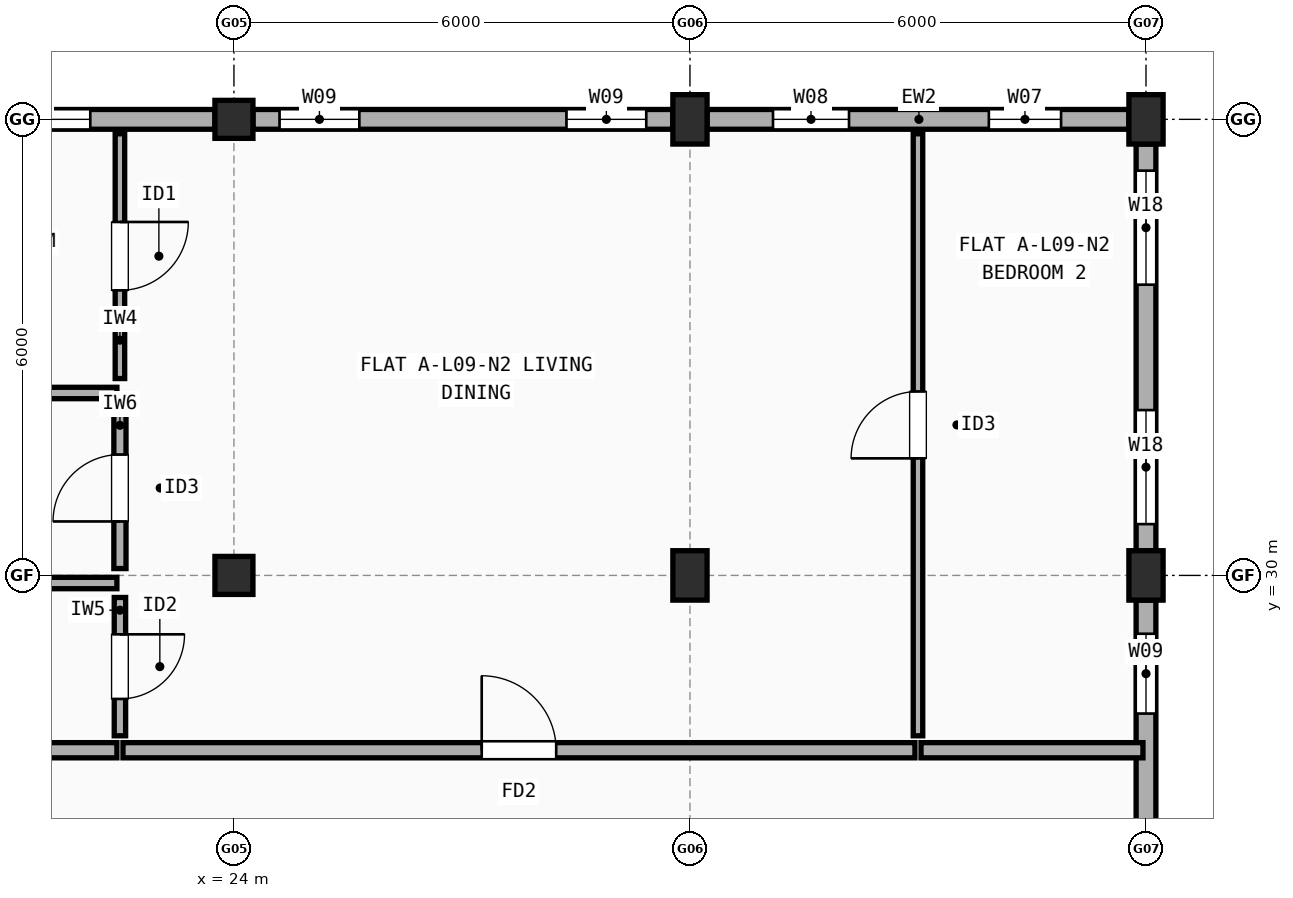
"""IFC4 building model, lengths in metres.
Left out: names, types, materials, properties, quantities, classifications, styles, units other than length and angle.
Written with IfcOpenShell. Run it as: python <this file> out.ifc"""

import sys

from ifc_helpers import new_model, si_unit, direction, frame, frame_2d, origin, origin_2d, place, context, subcontext, project, spatial, rectangle, extrude, element, fill, save


model = new_model("IFC4")
c1 = context("Model", 3, precision=1e-05, world=origin(), true_north=direction((0.0, 1.0)))
c2 = subcontext(c1, "Body", "Model", "MODEL_VIEW")
j1 = project(units=[si_unit("LENGTHUNIT", "METRE"), si_unit("PLANEANGLEUNIT", "RADIAN")], contexts=[c1])
p1 = place(None, origin())
s1 = spatial("IfcSite", under=j1, at=p1, CompositionType="ELEMENT")
p2 = place(p1, origin())
s2 = spatial("IfcBuilding", under=s1, at=p2, CompositionType="ELEMENT")
p3 = place(p2, frame((0.0, 0.0, 30.1)))
s3 = spatial("IfcBuildingStorey", under=s2, at=p3, CompositionType="ELEMENT", Elevation=30.1)
for number, where, z_axis, x_axis in (
    (1, (24.0, 30.0, 0.0), (0.0, 0.0, 1.0), (1.0, 0.0, 0.0)),
    (2, (24.0, 36.0, 0.0), (0.0, 0.0, 1.0), (1.0, 0.0, 0.0)),
):
    element("IfcColumn", number, at=place(p3, frame(where, z_axis=z_axis, x_axis=x_axis)), inside=s3, PredefinedType="COLUMN", context=c2, shape_type="SweptSolid", body=[
        extrude(rectangle(XDim=0.5, YDim=0.5, at=origin_2d()), origin(), (0.0, 0.0, 1.0), 2.985),
    ])
for number, where, z_axis, x_axis in (
    (3, (30.0, 30.0, 0.0), (0.0, 0.0, 1.0), (1.0, 0.0, 0.0)),
    (4, (30.0, 36.0, 0.0), (0.0, 0.0, 1.0), (1.0, 0.0, 0.0)),
    (5, (36.0, 30.0, 0.0), (0.0, 0.0, 1.0), (1.0, 0.0, 0.0)),
    (6, (36.0, 36.0, 0.0), (0.0, 0.0, 1.0), (1.0, 0.0, 0.0)),
):
    element("IfcColumn", number, at=place(p3, frame(where, z_axis=z_axis, x_axis=x_axis)), inside=s3, PredefinedType="COLUMN", context=c2, shape_type="SweptSolid", body=[
        extrude(rectangle(XDim=0.45, YDim=0.65, at=origin_2d()), origin(), (0.0, 0.0, 1.0), 2.985),
    ])
p4 = place(p3, frame((36.0, 24.325, 0.0), z_axis=(0.0, 0.0, 1.0), x_axis=(0.0, 1.0, 0.0)))
e7 = element("IfcWall", 7, at=p4, inside=s3, PredefinedType="STANDARD", context=c2, shape_type="SweptSolid", body=[
    extrude(rectangle(XDim=5.35, YDim=0.26, at=frame_2d((2.675, 0.0))), origin(), (0.0, 0.0, 1.0), 2.467),
])
p5 = place(p4, frame((1.143, 0.0, 0.9)))
e8 = element("IfcOpeningElement", 8, at=p5, cuts=e7, PredefinedType="OPENING", context=c2, shape_type="SweptSolid", body=[
    extrude(rectangle(XDim=1.05, YDim=1.35, at=frame_2d((0.525, 0.675))), frame((0.0, 0.14, 0.0), z_axis=(0.0, -1.0, 0.0), x_axis=(1.0, 0.0, 0.0)), (0.0, 0.0, 1.0), 0.28),
])
p6 = place(p4, frame((3.857, 0.0, 0.9)))
e9 = element("IfcOpeningElement", 9, at=p6, cuts=e7, PredefinedType="OPENING", context=c2, shape_type="SweptSolid", body=[
    extrude(rectangle(XDim=1.05, YDim=1.35, at=frame_2d((0.525, 0.675))), frame((0.0, 0.14, 0.0), z_axis=(0.0, -1.0, 0.0), x_axis=(1.0, 0.0, 0.0)), (0.0, 0.0, 1.0), 0.28),
])
p7 = place(p3, frame((36.0, 30.325, 0.0), z_axis=(0.0, 0.0, 1.0), x_axis=(0.0, 1.0, 0.0)))
e10 = element("IfcWall", 10, at=p7, inside=s3, PredefinedType="STANDARD", context=c2, shape_type="SweptSolid", body=[
    extrude(rectangle(XDim=5.35, YDim=0.26, at=frame_2d((2.675, 0.0))), origin(), (0.0, 0.0, 1.0), 2.467),
])
p8 = place(p7, frame((0.35, 0.0, 0.9)))
e11 = element("IfcOpeningElement", 11, at=p8, cuts=e10, PredefinedType="OPENING", context=c2, shape_type="SweptSolid", body=[
    extrude(rectangle(XDim=1.5, YDim=1.4, at=frame_2d((0.75, 0.7))), frame((0.0, 0.14, 0.0), z_axis=(0.0, -1.0, 0.0), x_axis=(1.0, 0.0, 0.0)), (0.0, 0.0, 1.0), 0.28),
])
p9 = place(p7, frame((3.5, 0.0, 0.9)))
e12 = element("IfcOpeningElement", 12, at=p9, cuts=e10, PredefinedType="OPENING", context=c2, shape_type="SweptSolid", body=[
    extrude(rectangle(XDim=1.5, YDim=1.4, at=frame_2d((0.75, 0.7))), frame((0.0, 0.14, 0.0), z_axis=(0.0, -1.0, 0.0), x_axis=(1.0, 0.0, 0.0)), (0.0, 0.0, 1.0), 0.28),
])
p10 = place(p3, frame((35.775, 36.0, 0.0), z_axis=(0.0, 0.0, 1.0), x_axis=(-1.0, 0.0, 0.0)))
e13 = element("IfcWall", 13, at=p10, inside=s3, PredefinedType="STANDARD", context=c2, shape_type="SweptSolid", body=[
    extrude(rectangle(XDim=5.55, YDim=0.26, at=frame_2d((2.775, 0.0))), origin(), (0.0, 0.0, 1.0), 2.467),
])
p11 = place(p10, frame((0.893, 0.0, 0.9)))
e14 = element("IfcOpeningElement", 14, at=p11, cuts=e13, PredefinedType="OPENING", context=c2, shape_type="SweptSolid", body=[
    extrude(rectangle(XDim=0.95, YDim=1.35, at=frame_2d((0.475, 0.675))), frame((0.0, 0.14, 0.0), z_axis=(0.0, -1.0, 0.0), x_axis=(1.0, 0.0, 0.0)), (0.0, 0.0, 1.0), 0.28),
])
p12 = place(p10, frame((3.683, 0.0, 0.9)))
e15 = element("IfcOpeningElement", 15, at=p12, cuts=e13, PredefinedType="OPENING", context=c2, shape_type="SweptSolid", body=[
    extrude(rectangle(XDim=1.0, YDim=1.4, at=frame_2d((0.5, 0.7))), frame((0.0, 0.14, 0.0), z_axis=(0.0, -1.0, 0.0), x_axis=(1.0, 0.0, 0.0)), (0.0, 0.0, 1.0), 0.28),
])
p13 = place(p3, frame((29.775, 36.0, 0.0), z_axis=(0.0, 0.0, 1.0), x_axis=(-1.0, 0.0, 0.0)))
e16 = element("IfcWall", 16, at=p13, inside=s3, PredefinedType="STANDARD", context=c2, shape_type="SweptSolid", body=[
    extrude(rectangle(XDim=5.525, YDim=0.26, at=frame_2d((2.762, 0.0))), origin(), (0.0, 0.0, 1.0), 2.467),
])
p14 = place(p13, frame((0.35, 0.0, 0.9)))
e17 = element("IfcOpeningElement", 17, at=p14, cuts=e16, PredefinedType="OPENING", context=c2, shape_type="SweptSolid", body=[
    extrude(rectangle(XDim=1.05, YDim=1.35, at=frame_2d((0.525, 0.675))), frame((0.0, 0.14, 0.0), z_axis=(0.0, -1.0, 0.0), x_axis=(1.0, 0.0, 0.0)), (0.0, 0.0, 1.0), 0.28),
])
p15 = place(p13, frame((4.125, 0.0, 0.9)))
e18 = element("IfcOpeningElement", 18, at=p15, cuts=e16, PredefinedType="OPENING", context=c2, shape_type="SweptSolid", body=[
    extrude(rectangle(XDim=1.05, YDim=1.35, at=frame_2d((0.525, 0.675))), frame((0.0, 0.14, 0.0), z_axis=(0.0, -1.0, 0.0), x_axis=(1.0, 0.0, 0.0)), (0.0, 0.0, 1.0), 0.28),
])
p16 = place(p3, frame((23.75, 36.0, 0.0), z_axis=(0.0, 0.0, 1.0), x_axis=(-1.0, 0.0, 0.0)))
e19 = element("IfcWall", 19, at=p16, inside=s3, PredefinedType="STANDARD", context=c2, shape_type="SweptSolid", body=[
    extrude(rectangle(XDim=5.5, YDim=0.26, at=frame_2d((2.75, 0.0))), origin(), (0.0, 0.0, 1.0), 2.467),
])
p17 = place(p16, frame((1.64, 0.0, 0.9)))
e20 = element("IfcOpeningElement", 20, at=p17, cuts=e19, PredefinedType="OPENING", context=c2, shape_type="SweptSolid", body=[
    extrude(rectangle(XDim=1.5, YDim=1.4, at=frame_2d((0.75, 0.7))), frame((0.0, 0.14, 0.0), z_axis=(0.0, -1.0, 0.0), x_axis=(1.0, 0.0, 0.0)), (0.0, 0.0, 1.0), 0.28),
])
p18 = place(p16, frame((3.65, 0.0, 0.9)))
e21 = element("IfcOpeningElement", 21, at=p18, cuts=e19, PredefinedType="OPENING", context=c2, shape_type="SweptSolid", body=[
    extrude(rectangle(XDim=1.5, YDim=1.4, at=frame_2d((0.75, 0.7))), frame((0.0, 0.14, 0.0), z_axis=(0.0, -1.0, 0.0), x_axis=(1.0, 0.0, 0.0)), (0.0, 0.0, 1.0), 0.28),
])
p19 = place(p3, frame((18.04, 27.7, 0.0), z_axis=(0.0, 0.0, 1.0), x_axis=(1.0, 0.0, 0.0)))
e22 = element("IfcWall", 22, at=p19, inside=s3, PredefinedType="SOLIDWALL", context=c2, shape_type="SweptSolid", body=[
    extrude(rectangle(XDim=4.42, YDim=0.2, at=frame_2d((2.21, 0.0))), origin(), (0.0, 0.0, 1.0), 2.985),
])
p20 = place(p3, frame((22.54, 27.7, 0.0), z_axis=(0.0, 0.0, 1.0), x_axis=(1.0, 0.0, 0.0)))
e23 = element("IfcWall", 23, at=p20, inside=s3, PredefinedType="SOLIDWALL", context=c2, shape_type="SweptSolid", body=[
    extrude(rectangle(XDim=10.42, YDim=0.2, at=frame_2d((5.21, 0.0))), origin(), (0.0, 0.0, 1.0), 2.467),
])
p21 = place(p20, frame((4.72, 0.0, 0.0)))
e24 = element("IfcOpeningElement", 24, at=p21, cuts=e23, PredefinedType="OPENING", context=c2, shape_type="SweptSolid", body=[
    extrude(rectangle(XDim=0.98, YDim=2.15, at=frame_2d((0.49, 1.075))), frame((0.0, 0.11, 0.0), z_axis=(0.0, -1.0, 0.0), x_axis=(1.0, 0.0, 0.0)), (0.0, 0.0, 1.0), 0.22),
])
p22 = place(p3, frame((22.5, 32.59, 0.0), z_axis=(0.0, 0.0, 1.0), x_axis=(0.0, 1.0, 0.0)))
e25 = element("IfcWall", 25, at=p22, inside=s3, PredefinedType="PARTITIONING", context=c2, shape_type="SweptSolid", body=[
    extrude(rectangle(XDim=3.22, YDim=0.125, at=frame_2d((1.61, 0.0))), origin(), (0.0, 0.0, 1.0), 2.985),
])
p23 = place(p22, frame((1.16, 0.0, 0.0)))
e26 = element("IfcOpeningElement", 26, at=p23, cuts=e25, PredefinedType="OPENING", context=c2, shape_type="SweptSolid", body=[
    extrude(rectangle(XDim=0.9, YDim=2.1, at=frame_2d((0.45, 1.05))), frame((0.0, 0.073, 0.0), z_axis=(0.0, -1.0, 0.0), x_axis=(1.0, 0.0, 0.0)), (0.0, 0.0, 1.0), 0.145),
])
p24 = place(p3, frame((22.5, 30.09, 0.0), z_axis=(0.0, 0.0, 1.0), x_axis=(0.0, 1.0, 0.0)))
e27 = element("IfcWall", 27, at=p24, inside=s3, PredefinedType="PLUMBINGWALL", context=c2, shape_type="SweptSolid", body=[
    extrude(rectangle(XDim=2.12, YDim=0.16, at=frame_2d((1.06, 0.0))), origin(), (0.0, 0.0, 1.0), 2.467),
])
p25 = place(p24, frame((0.62, 0.0, 0.0)))
e28 = element("IfcOpeningElement", 28, at=p25, cuts=e27, PredefinedType="OPENING", context=c2, shape_type="SweptSolid", body=[
    extrude(rectangle(XDim=0.88, YDim=2.1, at=frame_2d((0.44, 1.05))), frame((0.0, 0.09, 0.0), z_axis=(0.0, -1.0, 0.0), x_axis=(1.0, 0.0, 0.0)), (0.0, 0.0, 1.0), 0.18),
])
p26 = place(p3, frame((22.5, 27.89, 0.0), z_axis=(0.0, 0.0, 1.0), x_axis=(0.0, 1.0, 0.0)))
e29 = element("IfcWall", 29, at=p26, inside=s3, PredefinedType="PARTITIONING", context=c2, shape_type="SweptSolid", body=[
    extrude(rectangle(XDim=1.82, YDim=0.15, at=frame_2d((0.91, 0.0))), origin(), (0.0, 0.0, 1.0), 2.985),
])
p27 = place(p26, frame((0.485, 0.0, 0.0)))
e30 = element("IfcOpeningElement", 30, at=p27, cuts=e29, PredefinedType="OPENING", context=c2, shape_type="SweptSolid", body=[
    extrude(rectangle(XDim=0.85, YDim=2.1, at=frame_2d((0.425, 1.05))), frame((0.0, 0.085, 0.0), z_axis=(0.0, -1.0, 0.0), x_axis=(1.0, 0.0, 0.0)), (0.0, 0.0, 1.0), 0.17),
])
p28 = place(p3, frame((18.04, 32.4, 0.0), z_axis=(0.0, 0.0, 1.0), x_axis=(1.0, 0.0, 0.0)))
e31 = element("IfcWall", 31, at=p28, inside=s3, PredefinedType="PARTITIONING", context=c2, shape_type="SweptSolid", body=[
    extrude(rectangle(XDim=4.42, YDim=0.15, at=frame_2d((2.21, 0.0))), origin(), (0.0, 0.0, 1.0), 2.548),
])
p29 = place(p3, frame((18.36, 29.9, 0.0), z_axis=(0.0, 0.0, 1.0), x_axis=(1.0, 0.0, 0.0)))
e32 = element("IfcWall", 32, at=p29, inside=s3, PredefinedType="PARTITIONING", context=c2, shape_type="SweptSolid", body=[
    extrude(rectangle(XDim=4.1, YDim=0.15, at=frame_2d((2.05, 0.0))), origin(), (0.0, 0.0, 1.0), 2.467),
])
p30 = place(p3, frame((33.04, 27.7, 0.0), z_axis=(0.0, 0.0, 1.0), x_axis=(1.0, 0.0, 0.0)))
e33 = element("IfcWall", 33, at=p30, inside=s3, PredefinedType="SOLIDWALL", context=c2, shape_type="SweptSolid", body=[
    extrude(rectangle(XDim=2.92, YDim=0.2, at=frame_2d((1.46, 0.0))), origin(), (0.0, 0.0, 1.0), 2.467),
])
p31 = place(p3, frame((33.0, 27.89, 0.0), z_axis=(0.0, 0.0, 1.0), x_axis=(0.0, 1.0, 0.0)))
e34 = element("IfcWall", 34, at=p31, inside=s3, PredefinedType="PARTITIONING", context=c2, shape_type="SweptSolid", body=[
    extrude(rectangle(XDim=7.92, YDim=0.125, at=frame_2d((3.96, 0.0))), origin(), (0.0, 0.0, 1.0), 2.467),
])
p32 = place(p31, frame((3.65, 0.0, 0.0)))
e35 = element("IfcOpeningElement", 35, at=p32, cuts=e34, PredefinedType="OPENING", context=c2, shape_type="SweptSolid", body=[
    extrude(rectangle(XDim=0.88, YDim=2.1, at=frame_2d((0.44, 1.05))), frame((0.0, 0.073, 0.0), z_axis=(0.0, -1.0, 0.0), x_axis=(1.0, 0.0, 0.0)), (0.0, 0.0, 1.0), 0.145),
])
p33 = place(p6, origin())
e36 = element("IfcWindow", 36, at=p33, inside=s3, PartitioningType="SINGLE_PANEL", PredefinedType="WINDOW", context=c2, shape_type="SweptSolid", body=[
    extrude(rectangle(XDim=1.05, YDim=1.35, at=frame_2d((0.525, 0.675))), frame((0.0, 0.03, 0.0), z_axis=(0.0, -1.0, 0.0), x_axis=(1.0, 0.0, 0.0)), (0.0, 0.0, 1.0), 0.06),
])
fill(e9, e36)
p34 = place(p8, origin())
e37 = element("IfcWindow", 37, at=p34, inside=s3, PartitioningType="SINGLE_PANEL", PredefinedType="WINDOW", context=c2, shape_type="SweptSolid", body=[
    extrude(rectangle(XDim=1.5, YDim=1.4, at=frame_2d((0.75, 0.7))), frame((0.0, 0.03, 0.0), z_axis=(0.0, -1.0, 0.0), x_axis=(1.0, 0.0, 0.0)), (0.0, 0.0, 1.0), 0.06),
])
fill(e11, e37)
p35 = place(p9, origin())
e38 = element("IfcWindow", 38, at=p35, inside=s3, PartitioningType="SINGLE_PANEL", PredefinedType="WINDOW", context=c2, shape_type="SweptSolid", body=[
    extrude(rectangle(XDim=1.5, YDim=1.4, at=frame_2d((0.75, 0.7))), frame((0.0, 0.03, 0.0), z_axis=(0.0, -1.0, 0.0), x_axis=(1.0, 0.0, 0.0)), (0.0, 0.0, 1.0), 0.06),
])
fill(e12, e38)
p36 = place(p11, origin())
e39 = element("IfcWindow", 39, at=p36, inside=s3, PartitioningType="SINGLE_PANEL", PredefinedType="WINDOW", context=c2, shape_type="SweptSolid", body=[
    extrude(rectangle(XDim=0.95, YDim=1.35, at=frame_2d((0.475, 0.675))), frame((0.0, 0.03, 0.0), z_axis=(0.0, -1.0, 0.0), x_axis=(1.0, 0.0, 0.0)), (0.0, 0.0, 1.0), 0.06),
])
fill(e14, e39)
p37 = place(p12, origin())
e40 = element("IfcWindow", 40, at=p37, inside=s3, PartitioningType="SINGLE_PANEL", PredefinedType="WINDOW", context=c2, shape_type="SweptSolid", body=[
    extrude(rectangle(XDim=1.0, YDim=1.4, at=frame_2d((0.5, 0.7))), frame((0.0, 0.03, 0.0), z_axis=(0.0, -1.0, 0.0), x_axis=(1.0, 0.0, 0.0)), (0.0, 0.0, 1.0), 0.06),
])
fill(e15, e40)
p38 = place(p14, origin())
e41 = element("IfcWindow", 41, at=p38, inside=s3, PartitioningType="SINGLE_PANEL", PredefinedType="WINDOW", context=c2, shape_type="SweptSolid", body=[
    extrude(rectangle(XDim=1.05, YDim=1.35, at=frame_2d((0.525, 0.675))), frame((0.0, 0.03, 0.0), z_axis=(0.0, -1.0, 0.0), x_axis=(1.0, 0.0, 0.0)), (0.0, 0.0, 1.0), 0.06),
])
fill(e17, e41)
p39 = place(p15, origin())
e42 = element("IfcWindow", 42, at=p39, inside=s3, PartitioningType="SINGLE_PANEL", PredefinedType="WINDOW", context=c2, shape_type="SweptSolid", body=[
    extrude(rectangle(XDim=1.05, YDim=1.35, at=frame_2d((0.525, 0.675))), frame((0.0, 0.03, 0.0), z_axis=(0.0, -1.0, 0.0), x_axis=(1.0, 0.0, 0.0)), (0.0, 0.0, 1.0), 0.06),
])
fill(e18, e42)
p40 = place(p17, origin())
e43 = element("IfcWindow", 43, at=p40, inside=s3, PartitioningType="SINGLE_PANEL", PredefinedType="WINDOW", context=c2, shape_type="SweptSolid", body=[
    extrude(rectangle(XDim=1.5, YDim=1.4, at=frame_2d((0.75, 0.7))), frame((0.0, 0.03, 0.0), z_axis=(0.0, -1.0, 0.0), x_axis=(1.0, 0.0, 0.0)), (0.0, 0.0, 1.0), 0.06),
])
fill(e20, e43)
p41 = place(p21, origin())
e44 = element("IfcDoor", 44, at=p41, inside=s3, OperationType="SINGLE_SWING_LEFT", PredefinedType="DOOR", context=c2, shape_type="SweptSolid", body=[
    extrude(rectangle(XDim=0.98, YDim=2.15, at=frame_2d((0.49, 1.075))), frame((0.0, 0.025, 0.0), z_axis=(0.0, -1.0, 0.0), x_axis=(1.0, 0.0, 0.0)), (0.0, 0.0, 1.0), 0.05),
])
fill(e24, e44)
p42 = place(p23, origin())
e45 = element("IfcDoor", 45, at=p42, inside=s3, OperationType="SINGLE_SWING_RIGHT", PredefinedType="DOOR", context=c2, shape_type="SweptSolid", body=[
    extrude(rectangle(XDim=0.9, YDim=2.1, at=frame_2d((0.45, 1.05))), frame((0.0, 0.025, 0.0), z_axis=(0.0, -1.0, 0.0), x_axis=(1.0, 0.0, 0.0)), (0.0, 0.0, 1.0), 0.05),
])
fill(e26, e45)
p43 = place(p25, origin())
e46 = element("IfcDoor", 46, at=p43, inside=s3, OperationType="SINGLE_SWING_LEFT", PredefinedType="DOOR", context=c2, shape_type="SweptSolid", body=[
    extrude(rectangle(XDim=0.88, YDim=2.1, at=frame_2d((0.44, 1.05))), frame((0.0, 0.025, 0.0), z_axis=(0.0, -1.0, 0.0), x_axis=(1.0, 0.0, 0.0)), (0.0, 0.0, 1.0), 0.05),
])
fill(e28, e46)
p44 = place(p27, origin())
e47 = element("IfcDoor", 47, at=p44, inside=s3, OperationType="SINGLE_SWING_RIGHT", PredefinedType="DOOR", context=c2, shape_type="SweptSolid", body=[
    extrude(rectangle(XDim=0.85, YDim=2.1, at=frame_2d((0.425, 1.05))), frame((0.0, 0.025, 0.0), z_axis=(0.0, -1.0, 0.0), x_axis=(1.0, 0.0, 0.0)), (0.0, 0.0, 1.0), 0.05),
])
fill(e30, e47)
p45 = place(p32, origin())
e48 = element("IfcDoor", 48, at=p45, inside=s3, OperationType="SINGLE_SWING_LEFT", PredefinedType="DOOR", context=c2, shape_type="SweptSolid", body=[
    extrude(rectangle(XDim=0.88, YDim=2.1, at=frame_2d((0.44, 1.05))), frame((0.0, 0.025, 0.0), z_axis=(0.0, -1.0, 0.0), x_axis=(1.0, 0.0, 0.0)), (0.0, 0.0, 1.0), 0.05),
])
fill(e35, e48)
save(model, sys.argv[1])
